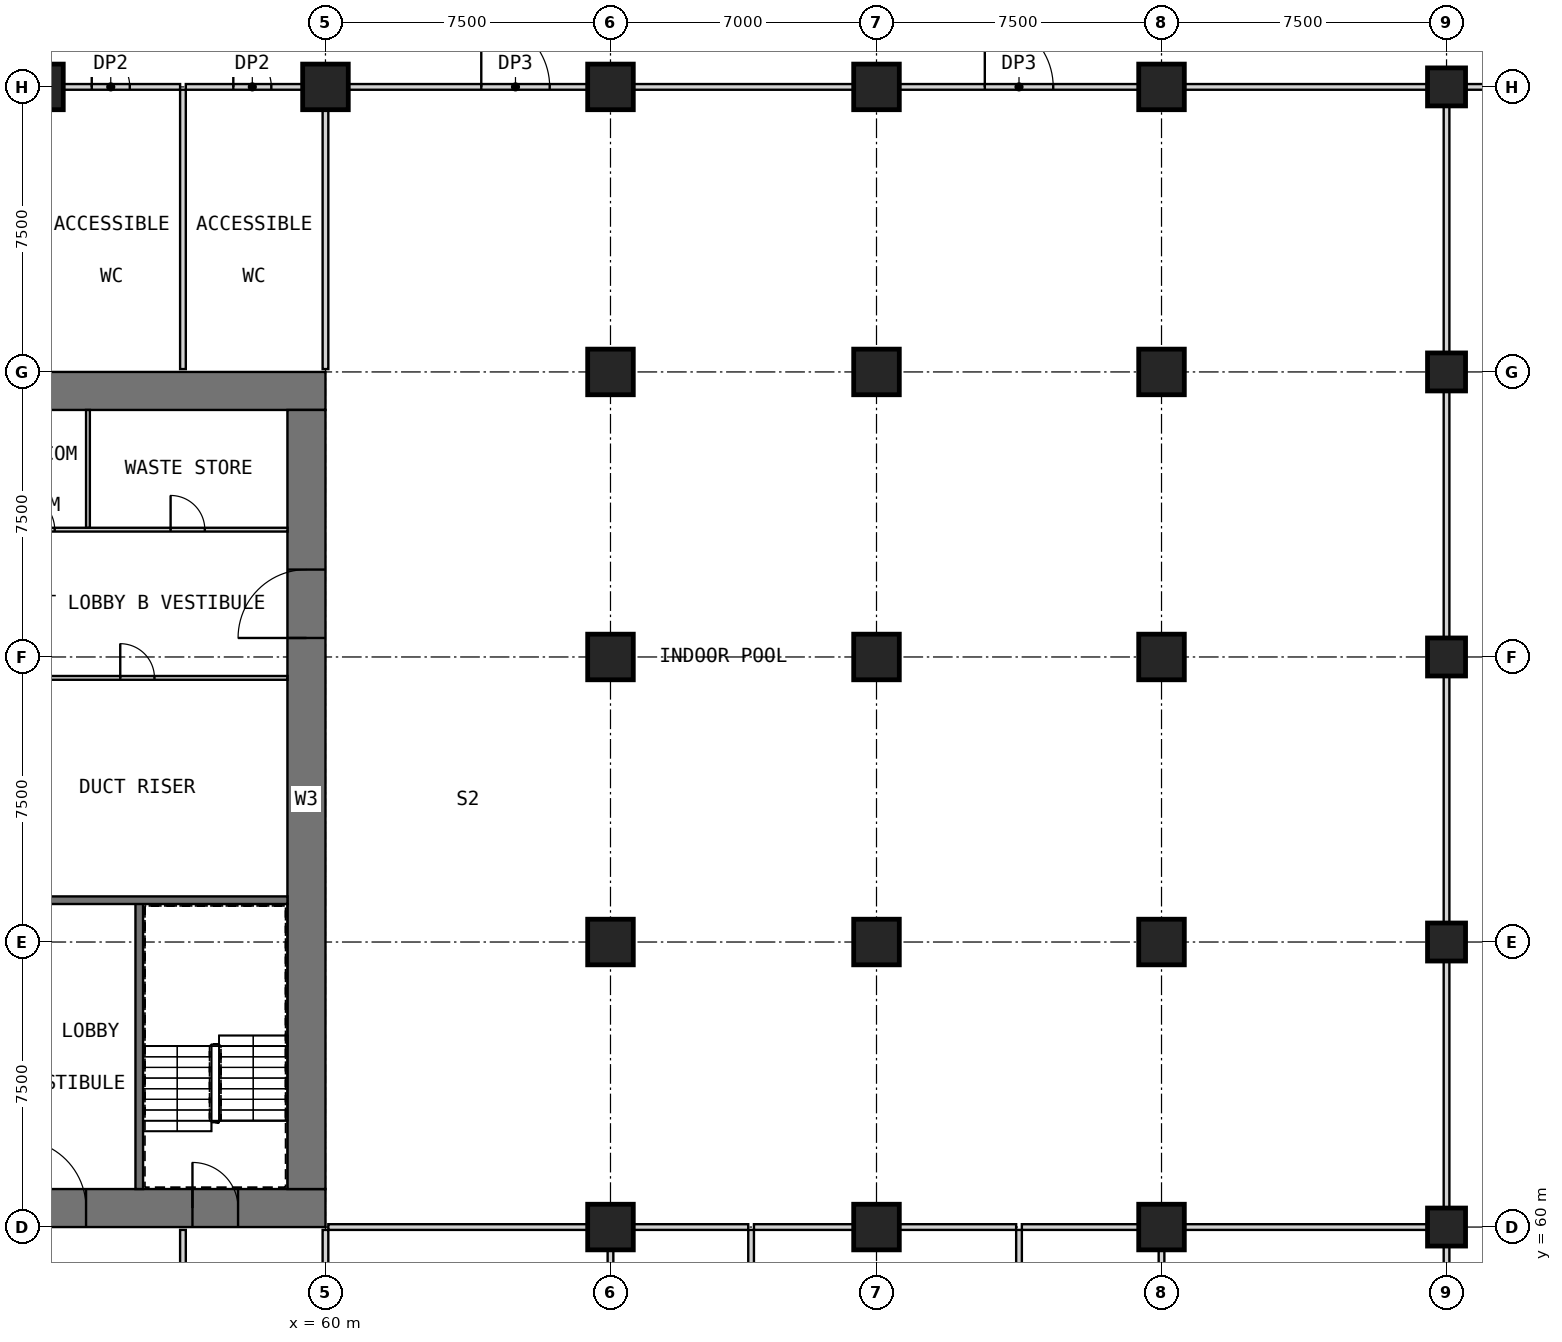
"""IFC4 building model, lengths in metres.
Left out: names, types, materials, properties, quantities, classifications, styles, units other than length and angle.
Written with IfcOpenShell. Run it as: python <this file> out.ifc"""

import sys

from ifc_helpers import new_model, si_unit, direction, frame, frame_2d, origin, origin_2d, place, context, subcontext, project, spatial, rectangle, extrude, element, fill, save


model = new_model("IFC4")
c1 = context("Model", 3, precision=1e-05, world=origin(), true_north=direction((0.0, 1.0)))
c2 = subcontext(c1, "Body", "Model", "MODEL_VIEW")
j1 = project(units=[si_unit("LENGTHUNIT", "METRE"), si_unit("PLANEANGLEUNIT", "RADIAN")], contexts=[c1])
p1 = place(None, origin())
s1 = spatial("IfcSite", under=j1, at=p1, CompositionType="ELEMENT")
p2 = place(p1, origin())
s2 = spatial("IfcBuilding", under=s1, at=p2, CompositionType="ELEMENT")
p3 = place(p2, frame((0.0, 0.0, 29.0)))
s3 = spatial("IfcBuildingStorey", under=s2, at=p3, CompositionType="ELEMENT", Elevation=29.0)
for number, where, z_axis, x_axis in (
    (1, (52.5, 90.0, 0.0), (0.0, 0.0, 1.0), (1.0, 0.0, 0.0)),
    (2, (60.0, 90.0, 0.0), (0.0, 0.0, 1.0), (1.0, 0.0, 0.0)),
    (3, (67.5, 60.0, 0.0), (0.0, 0.0, 1.0), (1.0, 0.0, 0.0)),
    (4, (67.5, 67.5, 0.0), (0.0, 0.0, 1.0), (1.0, 0.0, 0.0)),
    (5, (67.5, 75.0, 0.0), (0.0, 0.0, 1.0), (1.0, 0.0, 0.0)),
    (6, (67.5, 82.5, 0.0), (0.0, 0.0, 1.0), (1.0, 0.0, 0.0)),
    (7, (67.5, 90.0, 0.0), (0.0, 0.0, 1.0), (1.0, 0.0, 0.0)),
    (8, (74.5, 60.0, 0.0), (0.0, 0.0, 1.0), (1.0, 0.0, 0.0)),
    (9, (74.5, 67.5, 0.0), (0.0, 0.0, 1.0), (1.0, 0.0, 0.0)),
    (10, (74.5, 75.0, 0.0), (0.0, 0.0, 1.0), (1.0, 0.0, 0.0)),
    (11, (74.5, 82.5, 0.0), (0.0, 0.0, 1.0), (1.0, 0.0, 0.0)),
    (12, (74.5, 90.0, 0.0), (0.0, 0.0, 1.0), (1.0, 0.0, 0.0)),
    (13, (82.0, 60.0, 0.0), (0.0, 0.0, 1.0), (1.0, 0.0, 0.0)),
    (14, (82.0, 67.5, 0.0), (0.0, 0.0, 1.0), (1.0, 0.0, 0.0)),
    (15, (82.0, 75.0, 0.0), (0.0, 0.0, 1.0), (1.0, 0.0, 0.0)),
    (16, (82.0, 82.5, 0.0), (0.0, 0.0, 1.0), (1.0, 0.0, 0.0)),
    (17, (82.0, 90.0, 0.0), (0.0, 0.0, 1.0), (1.0, 0.0, 0.0)),
):
    element("IfcColumn", number, at=place(p3, frame(where, z_axis=z_axis, x_axis=x_axis)), inside=s3, PredefinedType="COLUMN", context=c2, shape_type="SweptSolid", body=[
        extrude(rectangle(XDim=1.2, YDim=1.2, at=origin_2d()), origin(), (0.0, 0.0, 1.0), 5.0),
    ])
for number, where, z_axis, x_axis in (
    (18, (89.5, 60.0, 0.0), (0.0, 0.0, 1.0), (1.0, 0.0, 0.0)),
    (19, (89.5, 67.5, 0.0), (0.0, 0.0, 1.0), (1.0, 0.0, 0.0)),
    (20, (89.5, 75.0, 0.0), (0.0, 0.0, 1.0), (1.0, 0.0, 0.0)),
    (21, (89.5, 82.5, 0.0), (0.0, 0.0, 1.0), (1.0, 0.0, 0.0)),
    (22, (89.5, 90.0, 0.0), (0.0, 0.0, 1.0), (1.0, 0.0, 0.0)),
):
    element("IfcColumn", number, at=place(p3, frame(where, z_axis=z_axis, x_axis=x_axis)), inside=s3, PredefinedType="COLUMN", context=c2, shape_type="SweptSolid", body=[
        extrude(rectangle(XDim=1.0, YDim=1.0, at=origin_2d()), origin(), (0.0, 0.0, 1.0), 5.0),
    ])
p4 = place(p3, frame((30.0, 60.5, 0.0), z_axis=(0.0, 0.0, 1.0), x_axis=(1.0, 0.0, 0.0)))
e23 = element("IfcWall", 23, at=p4, inside=s3, PredefinedType="SHEAR", context=c2, shape_type="SweptSolid", body=[
    extrude(rectangle(XDim=30.0, YDim=1.0, at=frame_2d((15.0, 0.0))), origin(), (0.0, 0.0, 1.0), 5.0),
])
p5 = place(p4, frame((21.9, 0.0, 0.0)))
e24 = element("IfcOpeningElement", 24, at=p5, cuts=e23, PredefinedType="OPENING", context=c2, shape_type="SweptSolid", body=[
    extrude(rectangle(XDim=1.8, YDim=2.1, at=frame_2d((0.9, 1.05))), frame((0.0, 0.51, 0.0), z_axis=(0.0, -1.0, 0.0), x_axis=(1.0, 0.0, 0.0)), (0.0, 0.0, 1.0), 1.02),
])
p6 = place(p4, frame((26.5, 0.0, 0.0)))
e25 = element("IfcOpeningElement", 25, at=p6, cuts=e23, PredefinedType="OPENING", context=c2, shape_type="SweptSolid", body=[
    extrude(rectangle(XDim=1.2, YDim=2.1, at=frame_2d((0.6, 1.05))), frame((0.0, 0.51, 0.0), z_axis=(0.0, -1.0, 0.0), x_axis=(1.0, 0.0, 0.0)), (0.0, 0.0, 1.0), 1.02),
])
p7 = place(p3, frame((30.0, 82.0, 0.0), z_axis=(0.0, 0.0, 1.0), x_axis=(1.0, 0.0, 0.0)))
e26 = element("IfcWall", 26, at=p7, inside=s3, PredefinedType="SHEAR", context=c2, shape_type="SweptSolid", body=[
    extrude(rectangle(XDim=30.0, YDim=1.0, at=frame_2d((15.0, 0.0))), origin(), (0.0, 0.0, 1.0), 5.0),
])
p8 = place(p3, frame((59.5, 61.0, 0.0), z_axis=(0.0, 0.0, 1.0), x_axis=(0.0, 1.0, 0.0)))
e27 = element("IfcWall", 27, at=p8, inside=s3, PredefinedType="SHEAR", context=c2, shape_type="SweptSolid", body=[
    extrude(rectangle(XDim=20.5, YDim=1.0, at=frame_2d((10.25, 0.0))), origin(), (0.0, 0.0, 1.0), 5.0),
])
p9 = place(p8, frame((14.5, 0.0, 0.0)))
e28 = element("IfcOpeningElement", 28, at=p9, cuts=e27, PredefinedType="OPENING", context=c2, shape_type="SweptSolid", body=[
    extrude(rectangle(XDim=1.8, YDim=2.1, at=frame_2d((0.9, 1.05))), frame((0.0, 0.51, 0.0), z_axis=(0.0, -1.0, 0.0), x_axis=(1.0, 0.0, 0.0)), (0.0, 0.0, 1.0), 1.02),
])
p10 = place(p3, frame((55.1, 61.0, 0.0), z_axis=(0.0, 0.0, 1.0), x_axis=(0.0, 1.0, 0.0)))
e29 = element("IfcWall", 29, at=p10, inside=s3, PredefinedType="SOLIDWALL", context=c2, shape_type="SweptSolid", body=[
    extrude(rectangle(XDim=7.6, YDim=0.2, at=frame_2d((3.8, 0.0))), origin(), (0.0, 0.0, 1.0), 4.75),
])
p11 = place(p3, frame((51.1, 68.6, 0.0), z_axis=(0.0, 0.0, 1.0), x_axis=(1.0, 0.0, 0.0)))
e30 = element("IfcWall", 30, at=p11, inside=s3, PredefinedType="SOLIDWALL", context=c2, shape_type="SweptSolid", body=[
    extrude(rectangle(XDim=7.9, YDim=0.2, at=frame_2d((3.95, 0.0))), origin(), (0.0, 0.0, 1.0), 4.75),
])
p12 = place(p3, frame((51.1, 74.45, 0.0), z_axis=(0.0, 0.0, 1.0), x_axis=(1.0, 0.0, 0.0)))
e31 = element("IfcWall", 31, at=p12, inside=s3, PredefinedType="PARTITIONING", context=c2, shape_type="SweptSolid", body=[
    extrude(rectangle(XDim=7.9, YDim=0.1, at=frame_2d((3.95, 0.0))), origin(), (0.0, 0.0, 1.0), 4.75),
])
p13 = place(p12, frame((3.5, 0.0, 0.0)))
e32 = element("IfcOpeningElement", 32, at=p13, cuts=e31, PredefinedType="OPENING", context=c2, shape_type="SweptSolid", body=[
    extrude(rectangle(XDim=0.9, YDim=2.1, at=frame_2d((0.45, 1.05))), frame((0.0, 0.06, 0.0), z_axis=(0.0, -1.0, 0.0), x_axis=(1.0, 0.0, 0.0)), (0.0, 0.0, 1.0), 0.12),
])
p14 = place(p3, frame((51.1, 78.35, 0.0), z_axis=(0.0, 0.0, 1.0), x_axis=(1.0, 0.0, 0.0)))
e33 = element("IfcWall", 33, at=p14, inside=s3, PredefinedType="PARTITIONING", context=c2, shape_type="SweptSolid", body=[
    extrude(rectangle(XDim=7.9, YDim=0.1, at=frame_2d((3.95, 0.0))), origin(), (0.0, 0.0, 1.0), 4.75),
])
p15 = place(p14, frame((0.875, 0.0, 0.0)))
e34 = element("IfcOpeningElement", 34, at=p15, cuts=e33, PredefinedType="OPENING", context=c2, shape_type="SweptSolid", body=[
    extrude(rectangle(XDim=0.9, YDim=2.1, at=frame_2d((0.45, 1.05))), frame((0.0, 0.06, 0.0), z_axis=(0.0, -1.0, 0.0), x_axis=(1.0, 0.0, 0.0)), (0.0, 0.0, 1.0), 0.12),
])
p16 = place(p14, frame((4.825, 0.0, 0.0)))
e35 = element("IfcOpeningElement", 35, at=p16, cuts=e33, PredefinedType="OPENING", context=c2, shape_type="SweptSolid", body=[
    extrude(rectangle(XDim=0.9, YDim=2.1, at=frame_2d((0.45, 1.05))), frame((0.0, 0.06, 0.0), z_axis=(0.0, -1.0, 0.0), x_axis=(1.0, 0.0, 0.0)), (0.0, 0.0, 1.0), 0.12),
])
p17 = place(p3, frame((53.75, 78.4, 0.0), z_axis=(0.0, 0.0, 1.0), x_axis=(0.0, 1.0, 0.0)))
e36 = element("IfcWall", 36, at=p17, inside=s3, PredefinedType="PARTITIONING", context=c2, shape_type="SweptSolid", body=[
    extrude(rectangle(XDim=3.1, YDim=0.1, at=frame_2d((1.55, 0.0))), origin(), (0.0, 0.0, 1.0), 4.75),
])
p18 = place(p3, frame((60.075, 60.0, 0.0), z_axis=(0.0, 0.0, 1.0), x_axis=(1.0, 0.0, 0.0)))
e37 = element("IfcWall", 37, at=p18, inside=s3, PredefinedType="PARTITIONING", context=c2, shape_type="SweptSolid", body=[
    extrude(rectangle(XDim=6.825, YDim=0.15, at=frame_2d((3.413, 0.0))), origin(), (0.0, 0.0, 1.0), 4.7),
])
p19 = place(p3, frame((68.1, 60.0, 0.0), z_axis=(0.0, 0.0, 1.0), x_axis=(1.0, 0.0, 0.0)))
e38 = element("IfcWall", 38, at=p19, inside=s3, PredefinedType="PARTITIONING", context=c2, shape_type="SweptSolid", body=[
    extrude(rectangle(XDim=3.025, YDim=0.15, at=frame_2d((1.512, 0.0))), origin(), (0.0, 0.0, 1.0), 4.7),
])
p20 = place(p3, frame((71.275, 60.0, 0.0), z_axis=(0.0, 0.0, 1.0), x_axis=(1.0, 0.0, 0.0)))
e39 = element("IfcWall", 39, at=p20, inside=s3, PredefinedType="PARTITIONING", context=c2, shape_type="SweptSolid", body=[
    extrude(rectangle(XDim=2.625, YDim=0.15, at=frame_2d((1.312, 0.0))), origin(), (0.0, 0.0, 1.0), 4.7),
])
for number, where, z_axis, x_axis in (
    (40, (75.1, 60.0, 0.0), (0.0, 0.0, 1.0), (1.0, 0.0, 0.0)),
    (41, (78.325, 60.0, 0.0), (0.0, 0.0, 1.0), (1.0, 0.0, 0.0)),
):
    element("IfcWall", number, at=place(p3, frame(where, z_axis=z_axis, x_axis=x_axis)), inside=s3, PredefinedType="PARTITIONING", context=c2, shape_type="SweptSolid", body=[
        extrude(rectangle(XDim=3.075, YDim=0.15, at=frame_2d((1.538, 0.0))), origin(), (0.0, 0.0, 1.0), 4.7),
    ])
p21 = place(p3, frame((82.6, 60.0, 0.0), z_axis=(0.0, 0.0, 1.0), x_axis=(1.0, 0.0, 0.0)))
e42 = element("IfcWall", 42, at=p21, inside=s3, PredefinedType="PARTITIONING", context=c2, shape_type="SweptSolid", body=[
    extrude(rectangle(XDim=6.4, YDim=0.15, at=frame_2d((3.2, 0.0))), origin(), (0.0, 0.0, 1.0), 4.7),
])
p22 = place(p3, frame((53.1, 90.0, 0.0), z_axis=(0.0, 0.0, 1.0), x_axis=(1.0, 0.0, 0.0)))
e43 = element("IfcWall", 43, at=p22, inside=s3, PredefinedType="PARTITIONING", context=c2, shape_type="SweptSolid", body=[
    extrude(rectangle(XDim=3.075, YDim=0.15, at=frame_2d((1.538, 0.0))), origin(), (0.0, 0.0, 1.0), 4.7),
])
p23 = place(p22, frame((0.75, 0.0, 0.0)))
e44 = element("IfcOpeningElement", 44, at=p23, cuts=e43, PredefinedType="OPENING", context=c2, shape_type="SweptSolid", body=[
    extrude(rectangle(XDim=1.0, YDim=2.1, at=frame_2d((0.5, 1.05))), frame((0.0, 0.085, 0.0), z_axis=(0.0, -1.0, 0.0), x_axis=(1.0, 0.0, 0.0)), (0.0, 0.0, 1.0), 0.17),
])
p24 = place(p3, frame((56.325, 90.0, 0.0), z_axis=(0.0, 0.0, 1.0), x_axis=(1.0, 0.0, 0.0)))
e45 = element("IfcWall", 45, at=p24, inside=s3, PredefinedType="PARTITIONING", context=c2, shape_type="SweptSolid", body=[
    extrude(rectangle(XDim=3.075, YDim=0.15, at=frame_2d((1.538, 0.0))), origin(), (0.0, 0.0, 1.0), 4.7),
])
p25 = place(p24, frame((1.25, 0.0, 0.0)))
e46 = element("IfcOpeningElement", 46, at=p25, cuts=e45, PredefinedType="OPENING", context=c2, shape_type="SweptSolid", body=[
    extrude(rectangle(XDim=1.0, YDim=2.1, at=frame_2d((0.5, 1.05))), frame((0.0, 0.085, 0.0), z_axis=(0.0, -1.0, 0.0), x_axis=(1.0, 0.0, 0.0)), (0.0, 0.0, 1.0), 0.17),
])
p26 = place(p3, frame((60.6, 90.0, 0.0), z_axis=(0.0, 0.0, 1.0), x_axis=(1.0, 0.0, 0.0)))
e47 = element("IfcWall", 47, at=p26, inside=s3, PredefinedType="PARTITIONING", context=c2, shape_type="SweptSolid", body=[
    extrude(rectangle(XDim=6.3, YDim=0.15, at=frame_2d((3.15, 0.0))), origin(), (0.0, 0.0, 1.0), 4.7),
])
p27 = place(p26, frame((3.5, 0.0, 0.0)))
e48 = element("IfcOpeningElement", 48, at=p27, cuts=e47, PredefinedType="OPENING", context=c2, shape_type="SweptSolid", body=[
    extrude(rectangle(XDim=1.8, YDim=2.4, at=frame_2d((0.9, 1.2))), frame((0.0, 0.085, 0.0), z_axis=(0.0, -1.0, 0.0), x_axis=(1.0, 0.0, 0.0)), (0.0, 0.0, 1.0), 0.17),
])
p28 = place(p3, frame((68.1, 90.0, 0.0), z_axis=(0.0, 0.0, 1.0), x_axis=(1.0, 0.0, 0.0)))
e49 = element("IfcWall", 49, at=p28, inside=s3, PredefinedType="PARTITIONING", context=c2, shape_type="SweptSolid", body=[
    extrude(rectangle(XDim=5.8, YDim=0.15, at=frame_2d((2.9, 0.0))), origin(), (0.0, 0.0, 1.0), 4.7),
])
p29 = place(p3, frame((75.1, 90.0, 0.0), z_axis=(0.0, 0.0, 1.0), x_axis=(1.0, 0.0, 0.0)))
e50 = element("IfcWall", 50, at=p29, inside=s3, PredefinedType="PARTITIONING", context=c2, shape_type="SweptSolid", body=[
    extrude(rectangle(XDim=6.3, YDim=0.15, at=frame_2d((3.15, 0.0))), origin(), (0.0, 0.0, 1.0), 4.7),
])
p30 = place(p29, frame((2.25, 0.0, 0.0)))
e51 = element("IfcOpeningElement", 51, at=p30, cuts=e50, PredefinedType="OPENING", context=c2, shape_type="SweptSolid", body=[
    extrude(rectangle(XDim=1.8, YDim=2.4, at=frame_2d((0.9, 1.2))), frame((0.0, 0.085, 0.0), z_axis=(0.0, -1.0, 0.0), x_axis=(1.0, 0.0, 0.0)), (0.0, 0.0, 1.0), 0.17),
])
for number, where, z_axis, x_axis in (
    (52, (82.6, 90.0, 0.0), (0.0, 0.0, 1.0), (1.0, 0.0, 0.0)),
    (53, (90.0, 90.0, 0.0), (0.0, 0.0, 1.0), (1.0, 0.0, 0.0)),
):
    element("IfcWall", number, at=place(p3, frame(where, z_axis=z_axis, x_axis=x_axis)), inside=s3, PredefinedType="PARTITIONING", context=c2, shape_type="SweptSolid", body=[
        extrude(rectangle(XDim=6.4, YDim=0.15, at=frame_2d((3.2, 0.0))), origin(), (0.0, 0.0, 1.0), 4.7),
    ])
for number, where, z_axis, x_axis in (
    (54, (56.25, 52.575, 0.0), (0.0, 0.0, 1.0), (0.0, 1.0, 0.0)),
    (55, (56.25, 82.575, 0.0), (0.0, 0.0, 1.0), (0.0, 1.0, 0.0)),
):
    element("IfcWall", number, at=place(p3, frame(where, z_axis=z_axis, x_axis=x_axis)), inside=s3, PredefinedType="PARTITIONING", context=c2, shape_type="SweptSolid", body=[
        extrude(rectangle(XDim=7.35, YDim=0.15, at=frame_2d((3.675, 0.0))), origin(), (0.0, 0.0, 1.0), 4.7),
    ])
for number, where, z_axis, x_axis in (
    (56, (89.5, 53.0, 0.0), (0.0, 0.0, 1.0), (0.0, 1.0, 0.0)),
    (57, (89.5, 60.5, 0.0), (0.0, 0.0, 1.0), (0.0, 1.0, 0.0)),
    (58, (89.5, 68.0, 0.0), (0.0, 0.0, 1.0), (0.0, 1.0, 0.0)),
    (59, (89.5, 75.5, 0.0), (0.0, 0.0, 1.0), (0.0, 1.0, 0.0)),
    (60, (89.5, 83.0, 0.0), (0.0, 0.0, 1.0), (0.0, 1.0, 0.0)),
):
    element("IfcWall", number, at=place(p3, frame(where, z_axis=z_axis, x_axis=x_axis)), inside=s3, PredefinedType="PARTITIONING", context=c2, shape_type="SweptSolid", body=[
        extrude(rectangle(XDim=6.5, YDim=0.15, at=frame_2d((3.25, 0.0))), origin(), (0.0, 0.0, 1.0), 4.25),
    ])
for number, where, z_axis, x_axis in (
    (61, (60.0, 53.1, 0.0), (0.0, 0.0, 1.0), (0.0, 1.0, 0.0)),
    (62, (60.0, 82.575, 0.0), (0.0, 0.0, 1.0), (0.0, 1.0, 0.0)),
):
    element("IfcWall", number, at=place(p3, frame(where, z_axis=z_axis, x_axis=x_axis)), inside=s3, PredefinedType="PARTITIONING", context=c2, shape_type="SweptSolid", body=[
        extrude(rectangle(XDim=6.825, YDim=0.15, at=frame_2d((3.413, 0.0))), origin(), (0.0, 0.0, 1.0), 4.7),
    ])
p31 = place(p3, frame((67.5, 53.1, 0.0), z_axis=(0.0, 0.0, 1.0), x_axis=(0.0, 1.0, 0.0)))
e63 = element("IfcWall", 63, at=p31, inside=s3, PredefinedType="PARTITIONING", context=c2, shape_type="SweptSolid", body=[
    extrude(rectangle(XDim=6.3, YDim=0.15, at=frame_2d((3.15, 0.0))), origin(), (0.0, 0.0, 1.0), 4.7),
])
for number, where, z_axis, x_axis in (
    (64, (71.2, 52.575, 0.0), (0.0, 0.0, 1.0), (0.0, 1.0, 0.0)),
    (65, (78.25, 52.575, 0.0), (0.0, 0.0, 1.0), (0.0, 1.0, 0.0)),
):
    element("IfcWall", number, at=place(p3, frame(where, z_axis=z_axis, x_axis=x_axis)), inside=s3, PredefinedType="PARTITIONING", context=c2, shape_type="SweptSolid", body=[
        extrude(rectangle(XDim=7.35, YDim=0.15, at=frame_2d((3.675, 0.0))), origin(), (0.0, 0.0, 1.0), 4.7),
    ])
p32 = place(p3, frame((82.0, 53.1, 0.0), z_axis=(0.0, 0.0, 1.0), x_axis=(0.0, 1.0, 0.0)))
e66 = element("IfcWall", 66, at=p32, inside=s3, PredefinedType="PARTITIONING", context=c2, shape_type="SweptSolid", body=[
    extrude(rectangle(XDim=6.3, YDim=0.15, at=frame_2d((3.15, 0.0))), origin(), (0.0, 0.0, 1.0), 4.7),
])
p33 = place(p5, origin())
e67 = element("IfcDoor", 67, at=p33, inside=s3, OperationType="DOUBLE_DOOR_SINGLE_SWING", PredefinedType="DOOR", context=c2, shape_type="SweptSolid", body=[
    extrude(rectangle(XDim=1.8, YDim=2.1, at=frame_2d((0.9, 1.05))), frame((0.0, 0.025, 0.0), z_axis=(0.0, -1.0, 0.0), x_axis=(1.0, 0.0, 0.0)), (0.0, 0.0, 1.0), 0.05),
])
fill(e24, e67)
p34 = place(p9, origin())
e68 = element("IfcDoor", 68, at=p34, inside=s3, OperationType="DOUBLE_DOOR_SINGLE_SWING", PredefinedType="DOOR", context=c2, shape_type="SweptSolid", body=[
    extrude(rectangle(XDim=1.8, YDim=2.1, at=frame_2d((0.9, 1.05))), frame((0.0, 0.025, 0.0), z_axis=(0.0, -1.0, 0.0), x_axis=(1.0, 0.0, 0.0)), (0.0, 0.0, 1.0), 0.05),
])
fill(e28, e68)
p35 = place(p6, origin())
e69 = element("IfcDoor", 69, at=p35, inside=s3, OperationType="SINGLE_SWING_LEFT", PredefinedType="DOOR", context=c2, shape_type="SweptSolid", body=[
    extrude(rectangle(XDim=1.2, YDim=2.1, at=frame_2d((0.6, 1.05))), frame((0.0, 0.025, 0.0), z_axis=(0.0, -1.0, 0.0), x_axis=(1.0, 0.0, 0.0)), (0.0, 0.0, 1.0), 0.05),
])
fill(e25, e69)
p36 = place(p13, origin())
e70 = element("IfcDoor", 70, at=p36, inside=s3, OperationType="SINGLE_SWING_LEFT", PredefinedType="DOOR", context=c2, shape_type="SweptSolid", body=[
    extrude(rectangle(XDim=0.9, YDim=2.1, at=frame_2d((0.45, 1.05))), frame((0.0, 0.025, 0.0), z_axis=(0.0, -1.0, 0.0), x_axis=(1.0, 0.0, 0.0)), (0.0, 0.0, 1.0), 0.05),
])
fill(e32, e70)
p37 = place(p15, origin())
e71 = element("IfcDoor", 71, at=p37, inside=s3, OperationType="SINGLE_SWING_LEFT", PredefinedType="DOOR", context=c2, shape_type="SweptSolid", body=[
    extrude(rectangle(XDim=0.9, YDim=2.1, at=frame_2d((0.45, 1.05))), frame((0.0, 0.025, 0.0), z_axis=(0.0, -1.0, 0.0), x_axis=(1.0, 0.0, 0.0)), (0.0, 0.0, 1.0), 0.05),
])
fill(e34, e71)
p38 = place(p16, origin())
e72 = element("IfcDoor", 72, at=p38, inside=s3, OperationType="SINGLE_SWING_RIGHT", PredefinedType="DOOR", context=c2, shape_type="SweptSolid", body=[
    extrude(rectangle(XDim=0.9, YDim=2.1, at=frame_2d((0.45, 1.05))), frame((0.0, 0.025, 0.0), z_axis=(0.0, -1.0, 0.0), x_axis=(1.0, 0.0, 0.0)), (0.0, 0.0, 1.0), 0.05),
])
fill(e35, e72)
p39 = place(p23, origin())
e73 = element("IfcDoor", 73, at=p39, inside=s3, OperationType="SINGLE_SWING_LEFT", PredefinedType="DOOR", context=c2, shape_type="SweptSolid", body=[
    extrude(rectangle(XDim=1.0, YDim=2.1, at=frame_2d((0.5, 1.05))), frame((0.0, 0.025, 0.0), z_axis=(0.0, -1.0, 0.0), x_axis=(1.0, 0.0, 0.0)), (0.0, 0.0, 1.0), 0.05),
])
fill(e44, e73)
p40 = place(p25, origin())
e74 = element("IfcDoor", 74, at=p40, inside=s3, OperationType="SINGLE_SWING_LEFT", PredefinedType="DOOR", context=c2, shape_type="SweptSolid", body=[
    extrude(rectangle(XDim=1.0, YDim=2.1, at=frame_2d((0.5, 1.05))), frame((0.0, 0.025, 0.0), z_axis=(0.0, -1.0, 0.0), x_axis=(1.0, 0.0, 0.0)), (0.0, 0.0, 1.0), 0.05),
])
fill(e46, e74)
p41 = place(p27, origin())
e75 = element("IfcDoor", 75, at=p41, inside=s3, OperationType="SINGLE_SWING_LEFT", PredefinedType="DOOR", context=c2, shape_type="SweptSolid", body=[
    extrude(rectangle(XDim=1.8, YDim=2.4, at=frame_2d((0.9, 1.2))), frame((0.0, 0.025, 0.0), z_axis=(0.0, -1.0, 0.0), x_axis=(1.0, 0.0, 0.0)), (0.0, 0.0, 1.0), 0.05),
])
fill(e48, e75)
p42 = place(p30, origin())
e76 = element("IfcDoor", 76, at=p42, inside=s3, OperationType="SINGLE_SWING_LEFT", PredefinedType="DOOR", context=c2, shape_type="SweptSolid", body=[
    extrude(rectangle(XDim=1.8, YDim=2.4, at=frame_2d((0.9, 1.2))), frame((0.0, 0.025, 0.0), z_axis=(0.0, -1.0, 0.0), x_axis=(1.0, 0.0, 0.0)), (0.0, 0.0, 1.0), 0.05),
])
fill(e51, e76)
save(model, sys.argv[1])
